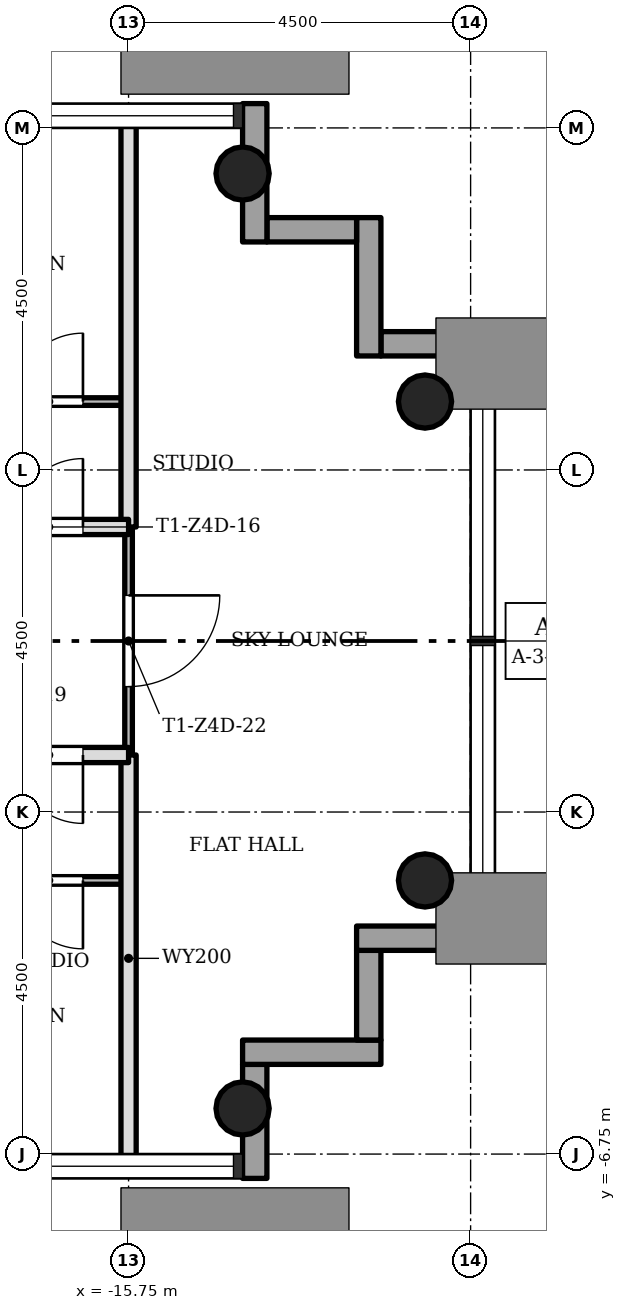
"""IFC4 building model, lengths in metres.
Left out: names, types, materials, properties, quantities, classifications, styles, units other than length and angle.
Written with IfcOpenShell. Run it as: python <this file> out.ifc"""

import sys

from ifc_helpers import new_model, si_unit, direction, frame, frame_2d, origin, origin_2d, place, context, subcontext, project, spatial, rectangle, hollow_circle, extrude, element, fill, save


model = new_model("IFC4")
c1 = context("Model", 3, precision=1e-05, world=origin(), true_north=direction((0.0, 1.0)))
c2 = subcontext(c1, "Body", "Model", "MODEL_VIEW")
j1 = project(units=[si_unit("LENGTHUNIT", "METRE"), si_unit("PLANEANGLEUNIT", "RADIAN")], contexts=[c1])
p1 = place(None, origin())
s1 = spatial("IfcSite", under=j1, at=p1, CompositionType="ELEMENT")
p2 = place(p1, origin())
s2 = spatial("IfcBuilding", under=s1, at=p2, CompositionType="ELEMENT")
p3 = place(p2, frame((0.0, 0.0, 202.8)))
s3 = spatial("IfcBuildingStorey", under=s2, at=p3, CompositionType="ELEMENT", Elevation=202.8)
for number, where, z_axis, x_axis in (
    (1, (-14.25, -6.15, 0.0), (0.0, 0.0, 1.0), (1.0, 0.0, 0.0)),
    (2, (-14.25, 6.15, 0.0), (0.0, 0.0, 1.0), (1.0, 0.0, 0.0)),
    (3, (-11.85, -3.15, 0.0), (0.0, 0.0, 1.0), (1.0, 0.0, 0.0)),
    (4, (-11.85, 3.15, 0.0), (0.0, 0.0, 1.0), (1.0, 0.0, 0.0)),
):
    element("IfcColumn", number, at=place(p3, frame(where, z_axis=z_axis, x_axis=x_axis)), inside=s3, PredefinedType="COLUMN", context=c2, shape_type="SweptSolid", body=[
        extrude(hollow_circle(Radius=0.35, WallThickness=0.025, at=origin_2d()), origin(), (0.0, 0.0, 1.0), 3.4),
    ])
p4 = place(p3, frame((-14.09, -7.07, -0.3), z_axis=(0.0, 0.0, 1.0), x_axis=(0.0, 1.0, 0.0)))
e5 = element("IfcWall", 5, at=p4, inside=s3, PredefinedType="STANDARD", context=c2, shape_type="SweptSolid", body=[
    extrude(rectangle(XDim=1.5, YDim=0.32, at=frame_2d((0.75, 0.0))), origin(), (0.0, 0.0, 1.0), 3.4),
])
p5 = place(p3, frame((-14.25, -5.41, -0.3), z_axis=(0.0, 0.0, 1.0), x_axis=(1.0, 0.0, 0.0)))
e6 = element("IfcWall", 6, at=p5, inside=s3, PredefinedType="STANDARD", context=c2, shape_type="SweptSolid", body=[
    extrude(rectangle(XDim=1.82, YDim=0.32, at=frame_2d((0.91, 0.0))), origin(), (0.0, 0.0, 1.0), 3.4),
])
p6 = place(p3, frame((-12.59, -5.25, -0.3), z_axis=(0.0, 0.0, 1.0), x_axis=(0.0, 1.0, 0.0)))
e7 = element("IfcWall", 7, at=p6, inside=s3, PredefinedType="STANDARD", context=c2, shape_type="SweptSolid", body=[
    extrude(rectangle(XDim=1.18, YDim=0.32, at=frame_2d((0.59, 0.0))), origin(), (0.0, 0.0, 1.0), 3.4),
])
p7 = place(p3, frame((-12.75, -3.91, -0.3), z_axis=(0.0, 0.0, 1.0), x_axis=(1.0, 0.0, 0.0)))
e8 = element("IfcWall", 8, at=p7, inside=s3, PredefinedType="STANDARD", context=c2, shape_type="SweptSolid", body=[
    extrude(rectangle(XDim=1.82, YDim=0.32, at=frame_2d((0.91, 0.0))), origin(), (0.0, 0.0, 1.0), 3.4),
])
p8 = place(p3, frame((-10.93, 3.91, -0.3), z_axis=(0.0, 0.0, 1.0), x_axis=(-1.0, 0.0, 0.0)))
e9 = element("IfcWall", 9, at=p8, inside=s3, PredefinedType="STANDARD", context=c2, shape_type="SweptSolid", body=[
    extrude(rectangle(XDim=1.5, YDim=0.32, at=frame_2d((0.75, 0.0))), origin(), (0.0, 0.0, 1.0), 3.4),
])
p9 = place(p3, frame((-12.59, 3.75, -0.3), z_axis=(0.0, 0.0, 1.0), x_axis=(0.0, 1.0, 0.0)))
e10 = element("IfcWall", 10, at=p9, inside=s3, PredefinedType="STANDARD", context=c2, shape_type="SweptSolid", body=[
    extrude(rectangle(XDim=1.82, YDim=0.32, at=frame_2d((0.91, 0.0))), origin(), (0.0, 0.0, 1.0), 3.4),
])
p10 = place(p3, frame((-12.75, 5.41, -0.3), z_axis=(0.0, 0.0, 1.0), x_axis=(-1.0, 0.0, 0.0)))
e11 = element("IfcWall", 11, at=p10, inside=s3, PredefinedType="STANDARD", context=c2, shape_type="SweptSolid", body=[
    extrude(rectangle(XDim=1.18, YDim=0.32, at=frame_2d((0.59, 0.0))), origin(), (0.0, 0.0, 1.0), 3.4),
])
p11 = place(p3, frame((-14.09, 5.25, -0.3), z_axis=(0.0, 0.0, 1.0), x_axis=(0.0, 1.0, 0.0)))
e12 = element("IfcWall", 12, at=p11, inside=s3, PredefinedType="STANDARD", context=c2, shape_type="SweptSolid", body=[
    extrude(rectangle(XDim=1.82, YDim=0.32, at=frame_2d((0.91, 0.0))), origin(), (0.0, 0.0, 1.0), 3.4),
])
p12 = place(p3, frame((-15.75, -1.5, 0.0), z_axis=(0.0, 0.0, 1.0), x_axis=(0.0, 1.0, 0.0)))
e13 = element("IfcWall", 13, at=p12, inside=s3, PredefinedType="PARTITIONING", context=c2, shape_type="SweptSolid", body=[
    extrude(rectangle(XDim=3.0, YDim=0.1, at=frame_2d((1.5, 0.0))), origin(), (0.0, 0.0, 1.0), 3.0),
])
p13 = place(p12, frame((0.9, 0.0, 0.0)))
e14 = element("IfcOpeningElement", 14, at=p13, cuts=e13, PredefinedType="OPENING", context=c2, shape_type="SweptSolid", body=[
    extrude(rectangle(XDim=1.2, YDim=2.1, at=frame_2d((0.6, 1.05))), frame((0.0, 0.06, 0.0), z_axis=(0.0, -1.0, 0.0), x_axis=(1.0, 0.0, 0.0)), (0.0, 0.0, 1.0), 0.12),
])
for number, where, z_axis, x_axis in (
    (15, (-15.75, -6.85, 0.0), (0.0, 0.0, 1.0), (0.0, 1.0, 0.0)),
    (16, (-15.75, 1.5, 0.0), (0.0, 0.0, 1.0), (0.0, 1.0, 0.0)),
):
    element("IfcWall", number, at=place(p3, frame(where, z_axis=z_axis, x_axis=x_axis)), inside=s3, PredefinedType="SOLIDWALL", context=c2, shape_type="SweptSolid", body=[
        extrude(rectangle(XDim=5.35, YDim=0.2, at=frame_2d((2.675, 0.0))), origin(), (0.0, 0.0, 1.0), 3.0),
    ])
p14 = place(p3, frame((-20.25, -3.15, 0.0), z_axis=(0.0, 0.0, 1.0), x_axis=(1.0, 0.0, 0.0)))
e17 = element("IfcWall", 17, at=p14, inside=s3, PredefinedType="PARTITIONING", context=c2, shape_type="SweptSolid", body=[
    extrude(rectangle(XDim=4.5, YDim=0.1, at=frame_2d((2.25, 0.0))), origin(), (0.0, 0.0, 1.0), 3.0),
])
p15 = place(p14, frame((3.0, 0.0, 0.0)))
e18 = element("IfcOpeningElement", 18, at=p15, cuts=e17, PredefinedType="OPENING", context=c2, shape_type="SweptSolid", body=[
    extrude(rectangle(XDim=0.9, YDim=2.1, at=frame_2d((0.45, 1.05))), frame((0.0, 0.06, 0.0), z_axis=(0.0, -1.0, 0.0), x_axis=(1.0, 0.0, 0.0)), (0.0, 0.0, 1.0), 0.12),
])
p16 = place(p3, frame((-20.25, -1.5, 0.0), z_axis=(0.0, 0.0, 1.0), x_axis=(1.0, 0.0, 0.0)))
e19 = element("IfcWall", 19, at=p16, inside=s3, PredefinedType="SOLIDWALL", context=c2, shape_type="SweptSolid", body=[
    extrude(rectangle(XDim=4.5, YDim=0.2, at=frame_2d((2.25, 0.0))), origin(), (0.0, 0.0, 1.0), 3.0),
])
p17 = place(p16, frame((3.0, 0.0, 0.0)))
e20 = element("IfcOpeningElement", 20, at=p17, cuts=e19, PredefinedType="OPENING", context=c2, shape_type="SweptSolid", body=[
    extrude(rectangle(XDim=0.9, YDim=2.1, at=frame_2d((0.45, 1.05))), frame((0.0, 0.11, 0.0), z_axis=(0.0, -1.0, 0.0), x_axis=(1.0, 0.0, 0.0)), (0.0, 0.0, 1.0), 0.22),
])
p18 = place(p3, frame((-20.25, 1.5, 0.0), z_axis=(0.0, 0.0, 1.0), x_axis=(1.0, 0.0, 0.0)))
e21 = element("IfcWall", 21, at=p18, inside=s3, PredefinedType="SOLIDWALL", context=c2, shape_type="SweptSolid", body=[
    extrude(rectangle(XDim=4.5, YDim=0.2, at=frame_2d((2.25, 0.0))), origin(), (0.0, 0.0, 1.0), 3.0),
])
p19 = place(p18, frame((3.0, 0.0, 0.0)))
e22 = element("IfcOpeningElement", 22, at=p19, cuts=e21, PredefinedType="OPENING", context=c2, shape_type="SweptSolid", body=[
    extrude(rectangle(XDim=0.9, YDim=2.1, at=frame_2d((0.45, 1.05))), frame((0.0, 0.11, 0.0), z_axis=(0.0, -1.0, 0.0), x_axis=(1.0, 0.0, 0.0)), (0.0, 0.0, 1.0), 0.22),
])
p20 = place(p3, frame((-20.25, 3.15, 0.0), z_axis=(0.0, 0.0, 1.0), x_axis=(1.0, 0.0, 0.0)))
e23 = element("IfcWall", 23, at=p20, inside=s3, PredefinedType="PARTITIONING", context=c2, shape_type="SweptSolid", body=[
    extrude(rectangle(XDim=4.5, YDim=0.1, at=frame_2d((2.25, 0.0))), origin(), (0.0, 0.0, 1.0), 3.0),
])
p21 = place(p20, frame((3.0, 0.0, 0.0)))
e24 = element("IfcOpeningElement", 24, at=p21, cuts=e23, PredefinedType="OPENING", context=c2, shape_type="SweptSolid", body=[
    extrude(rectangle(XDim=0.9, YDim=2.1, at=frame_2d((0.45, 1.05))), frame((0.0, 0.06, 0.0), z_axis=(0.0, -1.0, 0.0), x_axis=(1.0, 0.0, 0.0)), (0.0, 0.0, 1.0), 0.12),
])
p22 = place(p19, origin())
e25 = element("IfcDoor", 25, at=p22, inside=s3, OperationType="SINGLE_SWING_LEFT", PredefinedType="DOOR", context=c2, shape_type="SweptSolid", body=[
    extrude(rectangle(XDim=0.9, YDim=2.1, at=frame_2d((0.45, 1.05))), frame((0.0, 0.025, 0.0), z_axis=(0.0, -1.0, 0.0), x_axis=(1.0, 0.0, 0.0)), (0.0, 0.0, 1.0), 0.05),
])
fill(e22, e25)
p23 = place(p21, origin())
e26 = element("IfcDoor", 26, at=p23, inside=s3, OperationType="SINGLE_SWING_LEFT", PredefinedType="DOOR", context=c2, shape_type="SweptSolid", body=[
    extrude(rectangle(XDim=0.9, YDim=2.1, at=frame_2d((0.45, 1.05))), frame((0.0, 0.025, 0.0), z_axis=(0.0, -1.0, 0.0), x_axis=(1.0, 0.0, 0.0)), (0.0, 0.0, 1.0), 0.05),
])
fill(e24, e26)
p24 = place(p17, origin())
e27 = element("IfcDoor", 27, at=p24, inside=s3, OperationType="SINGLE_SWING_RIGHT", PredefinedType="DOOR", context=c2, shape_type="SweptSolid", body=[
    extrude(rectangle(XDim=0.9, YDim=2.1, at=frame_2d((0.45, 1.05))), frame((0.0, 0.025, 0.0), z_axis=(0.0, -1.0, 0.0), x_axis=(1.0, 0.0, 0.0)), (0.0, 0.0, 1.0), 0.05),
])
fill(e20, e27)
p25 = place(p15, origin())
e28 = element("IfcDoor", 28, at=p25, inside=s3, OperationType="SINGLE_SWING_RIGHT", PredefinedType="DOOR", context=c2, shape_type="SweptSolid", body=[
    extrude(rectangle(XDim=0.9, YDim=2.1, at=frame_2d((0.45, 1.05))), frame((0.0, 0.025, 0.0), z_axis=(0.0, -1.0, 0.0), x_axis=(1.0, 0.0, 0.0)), (0.0, 0.0, 1.0), 0.05),
])
fill(e18, e28)
p26 = place(p13, origin())
e29 = element("IfcDoor", 29, at=p26, inside=s3, OperationType="SINGLE_SWING_RIGHT", PredefinedType="DOOR", context=c2, shape_type="SweptSolid", body=[
    extrude(rectangle(XDim=1.2, YDim=2.1, at=frame_2d((0.6, 1.05))), frame((0.0, 0.025, 0.0), z_axis=(0.0, -1.0, 0.0), x_axis=(1.0, 0.0, 0.0)), (0.0, 0.0, 1.0), 0.05),
])
fill(e14, e29)
save(model, sys.argv[1])
